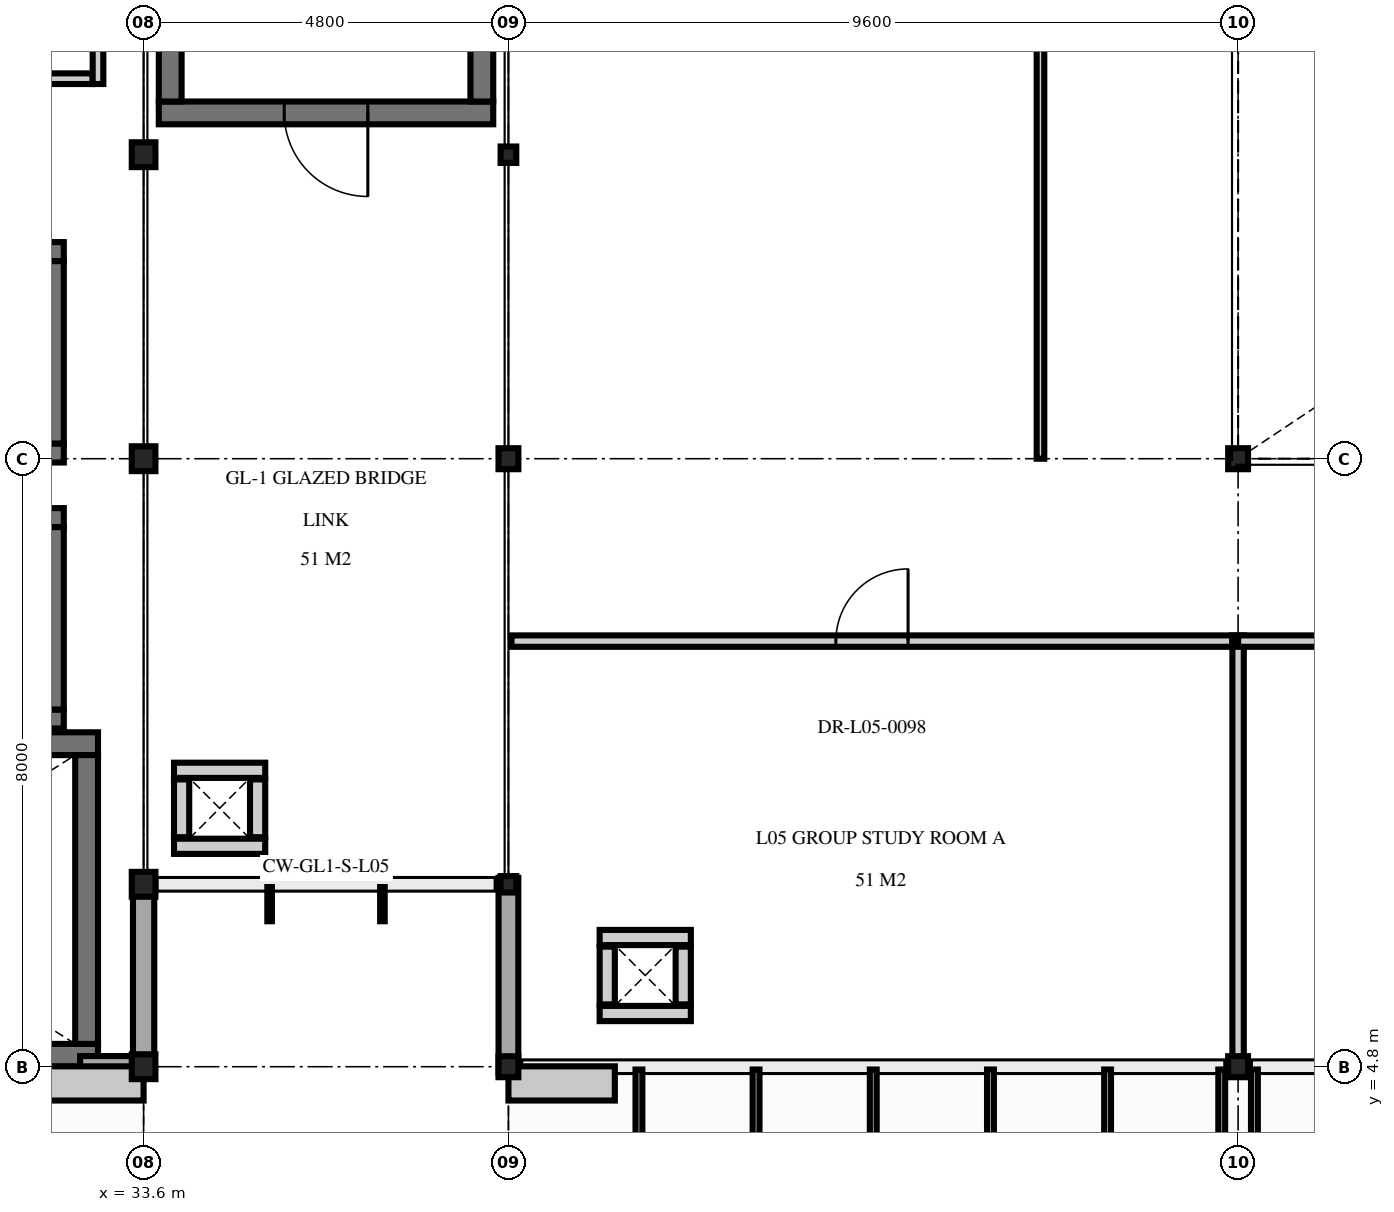
"""IFC4 building model, lengths in metres.
Left out: names, types, materials, properties, quantities, classifications, styles, units other than length and angle.
Written with IfcOpenShell. Run it as: python <this file> out.ifc"""

import sys

from ifc_helpers import new_model, si_unit, direction, frame, frame_2d, origin, origin_2d, place, context, subcontext, project, spatial, rectangle, i_section, extrude, element, fill, save


model = new_model("IFC4")
c1 = context("Model", 3, precision=1e-05, world=origin(), true_north=direction((0.0, 1.0)))
c2 = subcontext(c1, "Body", "Model", "MODEL_VIEW")
j1 = project(units=[si_unit("LENGTHUNIT", "METRE"), si_unit("PLANEANGLEUNIT", "RADIAN")], contexts=[c1])
p1 = place(None, origin())
s1 = spatial("IfcSite", under=j1, at=p1, CompositionType="ELEMENT")
p2 = place(p1, origin())
s2 = spatial("IfcBuilding", under=s1, at=p2, CompositionType="ELEMENT")
p3 = place(p2, frame((0.0, 0.0, 23.1)))
s3 = spatial("IfcBuildingStorey", under=s2, at=p3, CompositionType="ELEMENT", Elevation=23.1)
for number, where, z_axis, x_axis in (
    (1, (33.6, 4.8, 0.0), (0.0, 0.0, 1.0), (1.0, 0.0, 0.0)),
    (2, (33.6, 7.2, 0.0), (0.0, 0.0, 1.0), (1.0, 0.0, 0.0)),
    (3, (33.6, 12.8, 0.0), (0.0, 0.0, 1.0), (1.0, 0.0, 0.0)),
    (4, (33.6, 16.8, 0.0), (0.0, 0.0, 1.0), (1.0, 0.0, 0.0)),
):
    element("IfcColumn", number, at=place(p3, frame(where, z_axis=z_axis, x_axis=x_axis)), inside=s3, PredefinedType="COLUMN", context=c2, shape_type="SweptSolid", body=[
        extrude(i_section(OverallWidth=0.311, OverallDepth=0.327, WebThickness=0.016, FlangeThickness=0.025, at=origin_2d()), origin(), (0.0, 0.0, 1.0), 4.5),
    ])
for number, where, z_axis, x_axis in (
    (5, (38.4, 4.8, 0.0), (0.0, 0.0, 1.0), (1.0, 0.0, 0.0)),
    (6, (38.4, 12.8, 0.0), (0.0, 0.0, 1.0), (1.0, 0.0, 0.0)),
    (7, (48.0, 4.8, 0.0), (0.0, 0.0, 1.0), (1.0, 0.0, 0.0)),
    (8, (48.0, 12.8, 0.0), (0.0, 0.0, 1.0), (1.0, 0.0, 0.0)),
):
    element("IfcColumn", number, at=place(p3, frame(where, z_axis=z_axis, x_axis=x_axis)), inside=s3, PredefinedType="COLUMN", context=c2, shape_type="SweptSolid", body=[
        extrude(i_section(OverallWidth=0.261, OverallDepth=0.276, WebThickness=0.015, FlangeThickness=0.025, at=origin_2d()), origin(), (0.0, 0.0, 1.0), 4.5),
    ])
for number, where, z_axis, x_axis in (
    (9, (38.4, 7.2, 0.0), (0.0, 0.0, 1.0), (1.0, 0.0, 0.0)),
    (10, (38.4, 16.8, 0.0), (0.0, 0.0, 1.0), (1.0, 0.0, 0.0)),
):
    element("IfcColumn", number, at=place(p3, frame(where, z_axis=z_axis, x_axis=x_axis)), inside=s3, PredefinedType="COLUMN", context=c2, shape_type="SweptSolid", body=[
        extrude(i_section(OverallWidth=0.206, OverallDepth=0.216, WebThickness=0.01, FlangeThickness=0.017, at=origin_2d()), origin(), (0.0, 0.0, 1.0), 4.5),
    ])
p4 = place(p3, frame((33.0, 4.95, 0.0), z_axis=(0.0, 0.0, 1.0), x_axis=(-1.0, 0.0, 0.0)))
e11 = element("IfcWall", 11, at=p4, inside=s3, PredefinedType="SHEAR", context=c2, shape_type="SweptSolid", body=[
    extrude(rectangle(XDim=8.4, YDim=0.3, at=frame_2d((4.2, 0.0))), origin(), (0.0, 0.0, 1.0), 4.29),
])
p5 = place(p3, frame((24.6, 9.05, 0.0), z_axis=(0.0, 0.0, 1.0), x_axis=(1.0, 0.0, 0.0)))
e12 = element("IfcWall", 12, at=p5, inside=s3, PredefinedType="SHEAR", context=c2, shape_type="SweptSolid", body=[
    extrude(rectangle(XDim=8.4, YDim=0.3, at=frame_2d((4.2, 0.0))), origin(), (0.0, 0.0, 1.0), 4.29),
])
p6 = place(p5, frame((0.65, 0.0, 0.0)))
e13 = element("IfcOpeningElement", 13, at=p6, cuts=e12, PredefinedType="OPENING", context=c2, shape_type="SweptSolid", body=[
    extrude(rectangle(XDim=1.1, YDim=2.2, at=frame_2d((0.55, 1.1))), frame((0.0, 0.16, 0.0), z_axis=(0.0, -1.0, 0.0), x_axis=(1.0, 0.0, 0.0)), (0.0, 0.0, 1.0), 0.32),
])
p7 = place(p3, frame((32.85, 8.9, 0.0), z_axis=(0.0, 0.0, 1.0), x_axis=(0.0, -1.0, 0.0)))
e14 = element("IfcWall", 14, at=p7, inside=s3, PredefinedType="SHEAR", context=c2, shape_type="SweptSolid", body=[
    extrude(rectangle(XDim=3.8, YDim=0.3, at=frame_2d((1.9, 0.0))), origin(), (0.0, 0.0, 1.0), 4.29),
])
p8 = place(p3, frame((38.2, 17.35, 0.0), z_axis=(0.0, 0.0, 1.0), x_axis=(-1.0, 0.0, 0.0)))
e15 = element("IfcWall", 15, at=p8, inside=s3, PredefinedType="SHEAR", context=c2, shape_type="SweptSolid", body=[
    extrude(rectangle(XDim=4.4, YDim=0.3, at=frame_2d((2.2, 0.0))), origin(), (0.0, 0.0, 1.0), 4.29),
])
p9 = place(p8, frame((1.65, 0.0, 0.0)))
e16 = element("IfcOpeningElement", 16, at=p9, cuts=e15, PredefinedType="OPENING", context=c2, shape_type="SweptSolid", body=[
    extrude(rectangle(XDim=1.1, YDim=2.2, at=frame_2d((0.55, 1.1))), frame((0.0, 0.16, 0.0), z_axis=(0.0, -1.0, 0.0), x_axis=(1.0, 0.0, 0.0)), (0.0, 0.0, 1.0), 0.32),
])
for number, where, z_axis, x_axis in (
    (17, (33.95, 17.5, 0.0), (0.0, 0.0, 1.0), (0.0, 1.0, 0.0)),
    (18, (38.05, 25.3, 0.0), (0.0, 0.0, 1.0), (0.0, -1.0, 0.0)),
):
    element("IfcWall", number, at=place(p3, frame(where, z_axis=z_axis, x_axis=x_axis)), inside=s3, PredefinedType="SHEAR", context=c2, shape_type="SweptSolid", body=[
        extrude(rectangle(XDim=7.8, YDim=0.3, at=frame_2d((3.9, 0.0))), origin(), (0.0, 0.0, 1.0), 4.29),
    ])
for number, where, z_axis, x_axis in (
    (19, (32.55, 9.375, 0.0), (0.0, 0.0, 1.0), (-1.0, 0.0, 0.0)),
    (20, (29.65, 12.025, 0.0), (0.0, 0.0, 1.0), (1.0, 0.0, 0.0)),
):
    element("IfcWall", number, at=place(p3, frame(where, z_axis=z_axis, x_axis=x_axis)), inside=s3, PredefinedType="SHEAR", context=c2, shape_type="SweptSolid", body=[
        extrude(rectangle(XDim=2.9, YDim=0.25, at=frame_2d((1.45, 0.0))), origin(), (0.0, 0.0, 1.0), 4.29),
    ])
p10 = place(p3, frame((32.425, 11.9, 0.0), z_axis=(0.0, 0.0, 1.0), x_axis=(0.0, -1.0, 0.0)))
e21 = element("IfcWall", 21, at=p10, inside=s3, PredefinedType="SHEAR", context=c2, shape_type="SweptSolid", body=[
    extrude(rectangle(XDim=2.4, YDim=0.25, at=frame_2d((1.2, 0.0))), origin(), (0.0, 0.0, 1.0), 4.29),
])
p11 = place(p3, frame((32.55, 12.875, 0.0), z_axis=(0.0, 0.0, 1.0), x_axis=(-1.0, 0.0, 0.0)))
e22 = element("IfcWall", 22, at=p11, inside=s3, PredefinedType="SHEAR", context=c2, shape_type="SweptSolid", body=[
    extrude(rectangle(XDim=2.9, YDim=0.25, at=frame_2d((1.45, 0.0))), origin(), (0.0, 0.0, 1.0), 4.29),
])
p12 = place(p3, frame((29.65, 15.525, 0.0), z_axis=(0.0, 0.0, 1.0), x_axis=(1.0, 0.0, 0.0)))
e23 = element("IfcWall", 23, at=p12, inside=s3, PredefinedType="SHEAR", context=c2, shape_type="SweptSolid", body=[
    extrude(rectangle(XDim=2.9, YDim=0.25, at=frame_2d((1.45, 0.0))), origin(), (0.0, 0.0, 1.0), 4.29),
])
p13 = place(p12, frame((0.75, 0.0, 0.0)))
e24 = element("IfcOpeningElement", 24, at=p13, cuts=e23, PredefinedType="OPENING", context=c2, shape_type="SweptSolid", body=[
    extrude(rectangle(XDim=1.4, YDim=2.2, at=frame_2d((0.7, 1.1))), frame((0.0, 0.135, 0.0), z_axis=(0.0, -1.0, 0.0), x_axis=(1.0, 0.0, 0.0)), (0.0, 0.0, 1.0), 0.27),
])
p14 = place(p3, frame((32.425, 15.4, 0.0), z_axis=(0.0, 0.0, 1.0), x_axis=(0.0, -1.0, 0.0)))
e25 = element("IfcWall", 25, at=p14, inside=s3, PredefinedType="SHEAR", context=c2, shape_type="SweptSolid", body=[
    extrude(rectangle(XDim=2.4, YDim=0.25, at=frame_2d((1.2, 0.0))), origin(), (0.0, 0.0, 1.0), 4.29),
])
for number, where, z_axis, x_axis in (
    (26, (40.8, 5.5, 0.0), (0.0, 0.0, 1.0), (-1.0, 0.0, 0.0)),
    (27, (39.6, 6.5, 0.0), (0.0, 0.0, 1.0), (1.0, 0.0, 0.0)),
):
    element("IfcWall", number, at=place(p3, frame(where, z_axis=z_axis, x_axis=x_axis)), inside=s3, PredefinedType="PARTITIONING", context=c2, shape_type="SweptSolid", body=[
        extrude(rectangle(XDim=1.2, YDim=0.2, at=frame_2d((0.6, 0.0))), origin(), (0.0, 0.0, 1.0), 12.798),
    ])
for number, where, z_axis, x_axis in (
    (28, (39.7, 5.62, 0.0), (0.0, 0.0, 1.0), (0.0, 1.0, 0.0)),
    (29, (40.7, 6.38, 0.0), (0.0, 0.0, 1.0), (0.0, -1.0, 0.0)),
):
    element("IfcWall", number, at=place(p3, frame(where, z_axis=z_axis, x_axis=x_axis)), inside=s3, PredefinedType="PARTITIONING", context=c2, shape_type="SweptSolid", body=[
        extrude(rectangle(XDim=0.76, YDim=0.2, at=frame_2d((0.38, 0.0))), origin(), (0.0, 0.0, 1.0), 12.798),
    ])
for number, where, z_axis, x_axis in (
    (30, (35.2, 7.7, 0.0), (0.0, 0.0, 1.0), (-1.0, 0.0, 0.0)),
    (31, (34.0, 8.7, 0.0), (0.0, 0.0, 1.0), (1.0, 0.0, 0.0)),
):
    element("IfcWall", number, at=place(p3, frame(where, z_axis=z_axis, x_axis=x_axis)), inside=s3, PredefinedType="PARTITIONING", context=c2, shape_type="SweptSolid", body=[
        extrude(rectangle(XDim=1.2, YDim=0.2, at=frame_2d((0.6, 0.0))), origin(), (0.0, 0.0, 1.0), 3.79),
    ])
for number, where, z_axis, x_axis in (
    (32, (34.1, 7.82, 0.0), (0.0, 0.0, 1.0), (0.0, 1.0, 0.0)),
    (33, (35.1, 8.58, 0.0), (0.0, 0.0, 1.0), (0.0, -1.0, 0.0)),
):
    element("IfcWall", number, at=place(p3, frame(where, z_axis=z_axis, x_axis=x_axis)), inside=s3, PredefinedType="PARTITIONING", context=c2, shape_type="SweptSolid", body=[
        extrude(rectangle(XDim=0.76, YDim=0.2, at=frame_2d((0.38, 0.0))), origin(), (0.0, 0.0, 1.0), 3.79),
    ])
p15 = place(p3, frame((33.685, 4.8, 0.0), z_axis=(0.0, 0.0, 1.0), x_axis=(-1.0, 0.0, 0.0)))
e34 = element("IfcWall", 34, at=p15, inside=s3, PredefinedType="SOLIDWALL", context=c2, shape_type="SweptSolid", body=[
    extrude(rectangle(XDim=0.92, YDim=0.28, at=frame_2d((0.46, 0.0))), origin(), (0.0, 0.0, 1.0), 3.653),
])
p16 = place(p3, frame((33.6, 7.285, 0.0), z_axis=(0.0, 0.0, 1.0), x_axis=(0.0, -1.0, 0.0)))
e35 = element("IfcWall", 35, at=p16, inside=s3, PredefinedType="SOLIDWALL", context=c2, shape_type="SweptSolid", body=[
    extrude(rectangle(XDim=2.57, YDim=0.28, at=frame_2d((1.285, 0.0))), origin(), (0.0, 0.0, 1.0), 3.653),
])
p17 = place(p3, frame((38.4, 4.715, 0.0), z_axis=(0.0, 0.0, 1.0), x_axis=(0.0, 1.0, 0.0)))
e36 = element("IfcWall", 36, at=p17, inside=s3, PredefinedType="SOLIDWALL", context=c2, shape_type="SweptSolid", body=[
    extrude(rectangle(XDim=2.57, YDim=0.26, at=frame_2d((1.285, 0.0))), origin(), (0.0, 0.0, 1.0), 3.859),
])
p18 = place(p3, frame((29.57, 17.8, 0.0), z_axis=(0.0, 0.0, 1.0), x_axis=(1.0, 0.0, 0.0)))
e37 = element("IfcWall", 37, at=p18, inside=s3, PredefinedType="PARTITIONING", context=c2, shape_type="SweptSolid", body=[
    extrude(rectangle(XDim=3.36, YDim=0.14, at=frame_2d((1.68, 0.0))), origin(), (0.0, 0.0, 1.0), 3.995),
])
p19 = place(p3, frame((33.0, 17.73, 0.0), z_axis=(0.0, 0.0, 1.0), x_axis=(0.0, 1.0, 0.0)))
e38 = element("IfcWall", 38, at=p19, inside=s3, PredefinedType="PARTITIONING", context=c2, shape_type="SweptSolid", body=[
    extrude(rectangle(XDim=4.24, YDim=0.14, at=frame_2d((2.12, 0.0))), origin(), (0.0, 0.0, 1.0), 3.653),
])
p20 = place(p3, frame((38.44, 10.4, 0.0), z_axis=(0.0, 0.0, 1.0), x_axis=(1.0, 0.0, 0.0)))
e39 = element("IfcWall", 39, at=p20, inside=s3, PredefinedType="PARTITIONING", context=c2, shape_type="SweptSolid", body=[
    extrude(rectangle(XDim=9.485, YDim=0.15, at=frame_2d((4.743, 0.0))), origin(), (0.0, 0.0, 1.0), 3.859),
])
p21 = place(p20, frame((4.268, 0.0, 0.0)))
e40 = element("IfcOpeningElement", 40, at=p21, cuts=e39, PredefinedType="OPENING", context=c2, shape_type="SweptSolid", body=[
    extrude(rectangle(XDim=0.95, YDim=2.15, at=frame_2d((0.475, 1.075))), frame((0.0, 0.085, 0.0), z_axis=(0.0, -1.0, 0.0), x_axis=(1.0, 0.0, 0.0)), (0.0, 0.0, 1.0), 0.17),
])
p22 = place(p3, frame((48.0, 4.84, 0.0), z_axis=(0.0, 0.0, 1.0), x_axis=(0.0, 1.0, 0.0)))
e41 = element("IfcWall", 41, at=p22, inside=s3, PredefinedType="PARTITIONING", context=c2, shape_type="SweptSolid", body=[
    extrude(rectangle(XDim=5.635, YDim=0.15, at=frame_2d((2.817, 0.0))), origin(), (0.0, 0.0, 1.0), 8.273),
])
p23 = place(p3, frame((48.0, 10.4, 0.0), z_axis=(0.0, 0.0, 1.0), x_axis=(1.0, 0.0, 0.0)))
e42 = element("IfcWall", 42, at=p23, inside=s3, PredefinedType="PARTITIONING", context=c2, shape_type="SweptSolid", body=[
    extrude(rectangle(XDim=9.525, YDim=0.15, at=frame_2d((4.762, 0.0))), origin(), (0.0, 0.0, 1.0), 8.774),
])
p24 = place(p23, frame((4.287, 0.0, 0.0)))
e43 = element("IfcOpeningElement", 43, at=p24, cuts=e42, PredefinedType="OPENING", context=c2, shape_type="SweptSolid", body=[
    extrude(rectangle(XDim=0.95, YDim=2.15, at=frame_2d((0.475, 1.075))), frame((0.0, 0.085, 0.0), z_axis=(0.0, -1.0, 0.0), x_axis=(1.0, 0.0, 0.0)), (0.0, 0.0, 1.0), 0.17),
])
p25 = place(p3, frame((45.4, 12.8, 0.0), z_axis=(0.0, 0.0, 1.0), x_axis=(0.0, 1.0, 0.0)))
e44 = element("IfcWall", 44, at=p25, inside=s3, PredefinedType="MOVABLE", context=c2, shape_type="SweptSolid", body=[
    extrude(rectangle(XDim=15.96, YDim=0.1, at=frame_2d((7.98, 0.0))), origin(), (0.0, 0.0, 1.0), 10.666),
])
p26 = place(p25, frame((7.18, 0.0, 0.0)))
e45 = element("IfcOpeningElement", 45, at=p26, cuts=e44, PredefinedType="OPENING", context=c2, shape_type="SweptSolid", body=[
    extrude(rectangle(XDim=1.6, YDim=2.25, at=frame_2d((0.8, 1.125))), frame((0.0, 0.06, 0.0), z_axis=(0.0, -1.0, 0.0), x_axis=(1.0, 0.0, 0.0)), (0.0, 0.0, 1.0), 0.12),
])
p27 = place(p9, origin())
e46 = element("IfcDoor", 46, at=p27, inside=s3, OperationType="SINGLE_SWING_LEFT", PredefinedType="DOOR", context=c2, shape_type="SweptSolid", body=[
    extrude(rectangle(XDim=1.1, YDim=2.2, at=frame_2d((0.55, 1.1))), frame((0.0, 0.025, 0.0), z_axis=(0.0, -1.0, 0.0), x_axis=(1.0, 0.0, 0.0)), (0.0, 0.0, 1.0), 0.05),
])
fill(e16, e46)
p28 = place(p21, origin())
e47 = element("IfcDoor", 47, at=p28, inside=s3, OperationType="SINGLE_SWING_RIGHT", PredefinedType="DOOR", context=c2, shape_type="SweptSolid", body=[
    extrude(rectangle(XDim=0.95, YDim=2.15, at=frame_2d((0.475, 1.075))), frame((0.0, 0.025, 0.0), z_axis=(0.0, -1.0, 0.0), x_axis=(1.0, 0.0, 0.0)), (0.0, 0.0, 1.0), 0.05),
])
fill(e40, e47)
save(model, sys.argv[1])
